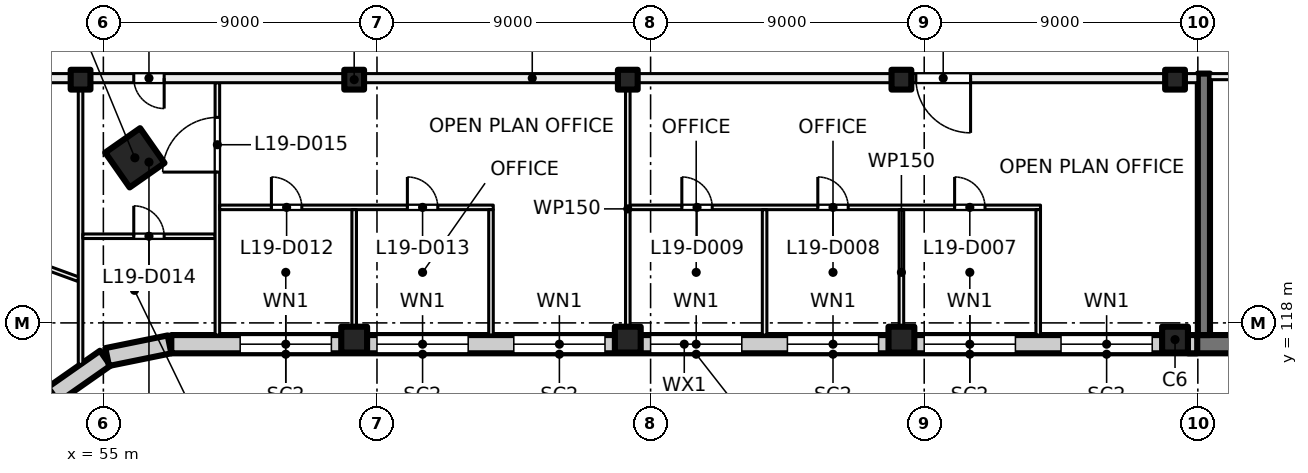
"""IFC4 building model, lengths in metres.
Left out: names, types, materials, properties, quantities, classifications, styles, units other than length and angle.
Written with IfcOpenShell. Run it as: python <this file> out.ifc"""

import sys

from ifc_helpers import new_model, si_unit, direction, frame, frame_2d, origin, origin_2d, place, context, subcontext, project, spatial, rectangle, hollow_rectangle, extrude, element, fill, save


model = new_model("IFC4")
c1 = context("Model", 3, precision=1e-05, world=origin(), true_north=direction((0.0, 1.0)))
c2 = subcontext(c1, "Body", "Model", "MODEL_VIEW")
j1 = project(units=[si_unit("LENGTHUNIT", "METRE"), si_unit("PLANEANGLEUNIT", "RADIAN")], contexts=[c1])
p1 = place(None, origin())
s1 = spatial("IfcSite", under=j1, at=p1, CompositionType="ELEMENT")
p2 = place(p1, origin())
s2 = spatial("IfcBuilding", under=s1, at=p2, CompositionType="ELEMENT")
p3 = place(p2, frame((0.0, 0.0, 85.0)))
s3 = spatial("IfcBuildingStorey", under=s2, at=p3, CompositionType="ELEMENT", Elevation=85.0)
p4 = place(p3, frame((56.036, 123.43, 0.0), z_axis=(0.0, 0.0, 1.0), x_axis=(0.573576436351, -0.819152044289, 0.0)))
e1 = element("IfcColumn", 1, at=p4, inside=s3, PredefinedType="COLUMN", context=c2, shape_type="SweptSolid", body=[
    extrude(hollow_rectangle(XDim=1.4, YDim=1.4, WallThickness=0.04, at=origin_2d()), origin(), (0.0, 0.0, 1.0), 4.0),
])
for number, where, z_axis, x_axis in (
    (2, (54.25, 126.0, 0.0), (0.0, 0.0, 1.0), (1.0, 0.0, 0.0)),
    (3, (63.25, 126.0, 0.0), (0.0, 0.0, 1.0), (1.0, 0.0, 0.0)),
    (4, (72.25, 126.0, 0.0), (0.0, 0.0, 1.0), (1.0, 0.0, 0.0)),
    (5, (81.25, 126.0, 0.0), (0.0, 0.0, 1.0), (1.0, 0.0, 0.0)),
    (6, (90.25, 126.0, 0.0), (0.0, 0.0, 1.0), (1.0, 0.0, 0.0)),
):
    element("IfcColumn", number, at=place(p3, frame(where, z_axis=z_axis, x_axis=x_axis)), inside=s3, PredefinedType="COLUMN", context=c2, shape_type="SweptSolid", body=[
        extrude(rectangle(XDim=0.65, YDim=0.65, at=origin_2d()), origin(), (0.0, 0.0, 1.0), 4.0),
    ])
for number, where, z_axis, x_axis in (
    (7, (63.25, 117.45, 0.0), (0.0, 0.0, 1.0), (1.0, 0.0, 0.0)),
    (8, (72.25, 117.45, 0.0), (0.0, 0.0, 1.0), (1.0, 0.0, 0.0)),
    (9, (81.25, 117.45, 0.0), (0.0, 0.0, 1.0), (1.0, 0.0, 0.0)),
    (10, (90.25, 117.45, 0.0), (0.0, 0.0, 1.0), (1.0, 0.0, 0.0)),
):
    element("IfcColumn", number, at=place(p3, frame(where, z_axis=z_axis, x_axis=x_axis)), inside=s3, PredefinedType="COLUMN", context=c2, shape_type="SweptSolid", body=[
        extrude(rectangle(XDim=0.85, YDim=0.85, at=origin_2d()), origin(), (0.0, 0.0, 1.0), 4.0),
    ])
p5 = place(p3, frame((99.6, 117.3, 0.0), z_axis=(0.0, 0.0, 1.0), x_axis=(-1.0, 0.0, 0.0)))
e11 = element("IfcWall", 11, at=p5, inside=s3, PredefinedType="SHEAR", context=c2, shape_type="SweptSolid", body=[
    extrude(rectangle(XDim=8.925, YDim=0.6, at=frame_2d((4.462, 0.0))), origin(), (0.0, 0.0, 1.0), 4.0),
])
p6 = place(p3, frame((91.2, 126.2, 0.0), z_axis=(0.0, 0.0, 1.0), x_axis=(0.0, -1.0, 0.0)))
e12 = element("IfcWall", 12, at=p6, inside=s3, PredefinedType="SHEAR", context=c2, shape_type="SweptSolid", body=[
    extrude(rectangle(XDim=8.6, YDim=0.4, at=frame_2d((4.3, 0.0))), origin(), (0.0, 0.0, 1.0), 4.0),
])
p7 = place(p3, frame((53.305, 115.578, 0.0), z_axis=(0.0, 0.0, 1.0), x_axis=(-0.522402266438, -0.852699168535, 0.0)))
e13 = element("IfcWall", 13, at=p7, inside=s3, PredefinedType="SOLIDWALL", context=c2, shape_type="SweptSolid", body=[
    extrude(rectangle(XDim=2.042, YDim=0.6, at=frame_2d((1.021, 0.0))), origin(), (0.0, 0.0, 1.0), 3.625),
])
for number, where, z_axis, x_axis in (
    (14, (55.062, 116.839, 0.0), (0.0, 0.0, 1.0), (-0.819, -0.574, 0.0)),
    (15, (57.175, 117.294, 0.0), (0.0, 0.0, 1.0), (-0.98, -0.199, 0.0)),
):
    element("IfcWall", number, at=place(p3, frame(where, z_axis=z_axis, x_axis=x_axis)), inside=s3, PredefinedType="SOLIDWALL", context=c2, shape_type="SweptSolid", body=[
        extrude(rectangle(XDim=2.092, YDim=0.6, at=frame_2d((1.046, 0.0))), origin(), (0.0, 0.0, 1.0), 3.625),
    ])
p8 = place(p3, frame((90.98, 117.3, 0.0), z_axis=(0.0, 0.0, 1.0), x_axis=(-1.0, 0.0, 0.0)))
e16 = element("IfcWall", 16, at=p8, inside=s3, PredefinedType="SOLIDWALL", context=c2, shape_type="SweptSolid", body=[
    extrude(rectangle(XDim=33.745, YDim=0.6, at=frame_2d((16.873, 0.0))), origin(), (0.0, 0.0, 1.0), 3.625),
])
p9 = place(p8, frame((1.48, 0.0, 0.9)))
e17 = element("IfcOpeningElement", 17, at=p9, cuts=e16, PredefinedType="OPENING", context=c2, shape_type="SweptSolid", body=[
    extrude(rectangle(XDim=3.0, YDim=2.4, at=frame_2d((1.5, 1.2))), frame((0.0, 0.31, 0.0), z_axis=(0.0, -1.0, 0.0), x_axis=(1.0, 0.0, 0.0)), (0.0, 0.0, 1.0), 0.62),
])
p10 = place(p8, frame((5.98, 0.0, 0.9)))
e18 = element("IfcOpeningElement", 18, at=p10, cuts=e16, PredefinedType="OPENING", context=c2, shape_type="SweptSolid", body=[
    extrude(rectangle(XDim=3.0, YDim=2.4, at=frame_2d((1.5, 1.2))), frame((0.0, 0.31, 0.0), z_axis=(0.0, -1.0, 0.0), x_axis=(1.0, 0.0, 0.0)), (0.0, 0.0, 1.0), 0.62),
])
p11 = place(p8, frame((10.48, 0.0, 0.9)))
e19 = element("IfcOpeningElement", 19, at=p11, cuts=e16, PredefinedType="OPENING", context=c2, shape_type="SweptSolid", body=[
    extrude(rectangle(XDim=3.0, YDim=2.4, at=frame_2d((1.5, 1.2))), frame((0.0, 0.31, 0.0), z_axis=(0.0, -1.0, 0.0), x_axis=(1.0, 0.0, 0.0)), (0.0, 0.0, 1.0), 0.62),
])
p12 = place(p8, frame((14.98, 0.0, 0.9)))
e20 = element("IfcOpeningElement", 20, at=p12, cuts=e16, PredefinedType="OPENING", context=c2, shape_type="SweptSolid", body=[
    extrude(rectangle(XDim=3.0, YDim=2.4, at=frame_2d((1.5, 1.2))), frame((0.0, 0.31, 0.0), z_axis=(0.0, -1.0, 0.0), x_axis=(1.0, 0.0, 0.0)), (0.0, 0.0, 1.0), 0.62),
])
p13 = place(p8, frame((19.48, 0.0, 0.9)))
e21 = element("IfcOpeningElement", 21, at=p13, cuts=e16, PredefinedType="OPENING", context=c2, shape_type="SweptSolid", body=[
    extrude(rectangle(XDim=3.0, YDim=2.4, at=frame_2d((1.5, 1.2))), frame((0.0, 0.31, 0.0), z_axis=(0.0, -1.0, 0.0), x_axis=(1.0, 0.0, 0.0)), (0.0, 0.0, 1.0), 0.62),
])
p14 = place(p8, frame((23.98, 0.0, 0.9)))
e22 = element("IfcOpeningElement", 22, at=p14, cuts=e16, PredefinedType="OPENING", context=c2, shape_type="SweptSolid", body=[
    extrude(rectangle(XDim=3.0, YDim=2.4, at=frame_2d((1.5, 1.2))), frame((0.0, 0.31, 0.0), z_axis=(0.0, -1.0, 0.0), x_axis=(1.0, 0.0, 0.0)), (0.0, 0.0, 1.0), 0.62),
])
p15 = place(p8, frame((28.48, 0.0, 0.9)))
e23 = element("IfcOpeningElement", 23, at=p15, cuts=e16, PredefinedType="OPENING", context=c2, shape_type="SweptSolid", body=[
    extrude(rectangle(XDim=3.0, YDim=2.4, at=frame_2d((1.5, 1.2))), frame((0.0, 0.31, 0.0), z_axis=(0.0, -1.0, 0.0), x_axis=(1.0, 0.0, 0.0)), (0.0, 0.0, 1.0), 0.62),
])
p16 = place(p3, frame((95.2, 126.1, 0.0), z_axis=(0.0, 0.0, 1.0), x_axis=(-1.0, 0.0, 0.0)))
e24 = element("IfcWall", 24, at=p16, inside=s3, PredefinedType="PARTITIONING", context=c2, shape_type="SweptSolid", body=[
    extrude(rectangle(XDim=3.8, YDim=0.2, at=frame_2d((1.9, 0.0))), origin(), (0.0, 0.0, 1.0), 3.625),
])
p17 = place(p16, frame((0.3, 0.0, 0.0)))
e25 = element("IfcOpeningElement", 25, at=p17, cuts=e24, PredefinedType="OPENING", context=c2, shape_type="SweptSolid", body=[
    extrude(rectangle(XDim=1.2, YDim=2.1, at=frame_2d((0.6, 1.05))), frame((0.0, 0.11, 0.0), z_axis=(0.0, -1.0, 0.0), x_axis=(1.0, 0.0, 0.0)), (0.0, 0.0, 1.0), 0.22),
])
p18 = place(p3, frame((46.178, 122.349, 0.0), z_axis=(0.0, 0.0, 1.0), x_axis=(0.939669476286, -0.342083725624, 0.0)))
e26 = element("IfcWall", 26, at=p18, inside=s3, PredefinedType="PARTITIONING", context=c2, shape_type="SweptSolid", body=[
    extrude(rectangle(XDim=8.516, YDim=0.15, at=frame_2d((4.258, 0.0))), origin(), (0.0, 0.0, 1.0), 3.625),
])
p19 = place(p3, frame((54.25, 116.637, 0.0), z_axis=(0.0, 0.0, 1.0), x_axis=(0.0, 1.0, 0.0)))
e27 = element("IfcWall", 27, at=p19, inside=s3, PredefinedType="PARTITIONING", context=c2, shape_type="SweptSolid", body=[
    extrude(rectangle(XDim=9.263, YDim=0.15, at=frame_2d((4.631, 0.0))), origin(), (0.0, 0.0, 1.0), 3.625),
])
p20 = place(p3, frame((54.325, 120.85, 0.0), z_axis=(0.0, 0.0, 1.0), x_axis=(1.0, 0.0, 0.0)))
e28 = element("IfcWall", 28, at=p20, inside=s3, PredefinedType="PARTITIONING", context=c2, shape_type="SweptSolid", body=[
    extrude(rectangle(XDim=4.35, YDim=0.15, at=frame_2d((2.175, 0.0))), origin(), (0.0, 0.0, 1.0), 3.625),
])
p21 = place(p20, frame((1.675, 0.0, 0.0)))
e29 = element("IfcOpeningElement", 29, at=p21, cuts=e28, PredefinedType="OPENING", context=c2, shape_type="SweptSolid", body=[
    extrude(rectangle(XDim=1.0, YDim=2.1, at=frame_2d((0.5, 1.05))), frame((0.0, 0.085, 0.0), z_axis=(0.0, -1.0, 0.0), x_axis=(1.0, 0.0, 0.0)), (0.0, 0.0, 1.0), 0.17),
])
p22 = place(p3, frame((58.75, 117.6, 0.0), z_axis=(0.0, 0.0, 1.0), x_axis=(0.0, 1.0, 0.0)))
e30 = element("IfcWall", 30, at=p22, inside=s3, PredefinedType="PARTITIONING", context=c2, shape_type="SweptSolid", body=[
    extrude(rectangle(XDim=8.3, YDim=0.15, at=frame_2d((4.15, 0.0))), origin(), (0.0, 0.0, 1.0), 3.625),
])
p23 = place(p22, frame((5.36, 0.0, 0.0)))
e31 = element("IfcOpeningElement", 31, at=p23, cuts=e30, PredefinedType="OPENING", context=c2, shape_type="SweptSolid", body=[
    extrude(rectangle(XDim=1.8, YDim=2.1, at=frame_2d((0.9, 1.05))), frame((0.0, 0.085, 0.0), z_axis=(0.0, -1.0, 0.0), x_axis=(1.0, 0.0, 0.0)), (0.0, 0.0, 1.0), 0.17),
])
p24 = place(p3, frame((58.825, 121.8, 0.0), z_axis=(0.0, 0.0, 1.0), x_axis=(1.0, 0.0, 0.0)))
e32 = element("IfcWall", 32, at=p24, inside=s3, PredefinedType="PARTITIONING", context=c2, shape_type="SweptSolid", body=[
    extrude(rectangle(XDim=9.0, YDim=0.15, at=frame_2d((4.5, 0.0))), origin(), (0.0, 0.0, 1.0), 3.625),
])
p25 = place(p24, frame((1.702, 0.0, 0.0)))
e33 = element("IfcOpeningElement", 33, at=p25, cuts=e32, PredefinedType="OPENING", context=c2, shape_type="SweptSolid", body=[
    extrude(rectangle(XDim=1.0, YDim=2.1, at=frame_2d((0.5, 1.05))), frame((0.0, 0.085, 0.0), z_axis=(0.0, -1.0, 0.0), x_axis=(1.0, 0.0, 0.0)), (0.0, 0.0, 1.0), 0.17),
])
p26 = place(p24, frame((6.175, 0.0, 0.0)))
e34 = element("IfcOpeningElement", 34, at=p26, cuts=e32, PredefinedType="OPENING", context=c2, shape_type="SweptSolid", body=[
    extrude(rectangle(XDim=1.0, YDim=2.1, at=frame_2d((0.5, 1.05))), frame((0.0, 0.085, 0.0), z_axis=(0.0, -1.0, 0.0), x_axis=(1.0, 0.0, 0.0)), (0.0, 0.0, 1.0), 0.17),
])
for number, where, z_axis, x_axis in (
    (35, (63.25, 121.725, 0.0), (0.0, 0.0, 1.0), (0.0, -1.0, 0.0)),
    (36, (67.75, 117.6, 0.0), (0.0, 0.0, 1.0), (0.0, 1.0, 0.0)),
):
    element("IfcWall", number, at=place(p3, frame(where, z_axis=z_axis, x_axis=x_axis)), inside=s3, PredefinedType="PARTITIONING", context=c2, shape_type="SweptSolid", body=[
        extrude(rectangle(XDim=4.125, YDim=0.15, at=frame_2d((2.062, 0.0))), origin(), (0.0, 0.0, 1.0), 3.625),
    ])
p27 = place(p3, frame((72.25, 117.6, 0.0), z_axis=(0.0, 0.0, 1.0), x_axis=(0.0, 1.0, 0.0)))
e37 = element("IfcWall", 37, at=p27, inside=s3, PredefinedType="PARTITIONING", context=c2, shape_type="SweptSolid", body=[
    extrude(rectangle(XDim=8.3, YDim=0.15, at=frame_2d((4.15, 0.0))), origin(), (0.0, 0.0, 1.0), 3.625),
])
p28 = place(p3, frame((72.325, 121.8, 0.0), z_axis=(0.0, 0.0, 1.0), x_axis=(1.0, 0.0, 0.0)))
e38 = element("IfcWall", 38, at=p28, inside=s3, PredefinedType="PARTITIONING", context=c2, shape_type="SweptSolid", body=[
    extrude(rectangle(XDim=13.5, YDim=0.15, at=frame_2d((6.75, 0.0))), origin(), (0.0, 0.0, 1.0), 3.625),
])
p29 = place(p28, frame((10.675, 0.0, 0.0)))
e39 = element("IfcOpeningElement", 39, at=p29, cuts=e38, PredefinedType="OPENING", context=c2, shape_type="SweptSolid", body=[
    extrude(rectangle(XDim=1.0, YDim=2.1, at=frame_2d((0.5, 1.05))), frame((0.0, 0.085, 0.0), z_axis=(0.0, -1.0, 0.0), x_axis=(1.0, 0.0, 0.0)), (0.0, 0.0, 1.0), 0.17),
])
p30 = place(p28, frame((6.175, 0.0, 0.0)))
e40 = element("IfcOpeningElement", 40, at=p30, cuts=e38, PredefinedType="OPENING", context=c2, shape_type="SweptSolid", body=[
    extrude(rectangle(XDim=1.0, YDim=2.1, at=frame_2d((0.5, 1.05))), frame((0.0, 0.085, 0.0), z_axis=(0.0, -1.0, 0.0), x_axis=(1.0, 0.0, 0.0)), (0.0, 0.0, 1.0), 0.17),
])
p31 = place(p28, frame((1.702, 0.0, 0.0)))
e41 = element("IfcOpeningElement", 41, at=p31, cuts=e38, PredefinedType="OPENING", context=c2, shape_type="SweptSolid", body=[
    extrude(rectangle(XDim=1.0, YDim=2.1, at=frame_2d((0.5, 1.05))), frame((0.0, 0.085, 0.0), z_axis=(0.0, -1.0, 0.0), x_axis=(1.0, 0.0, 0.0)), (0.0, 0.0, 1.0), 0.17),
])
for number, where, z_axis, x_axis in (
    (42, (76.75, 117.6, 0.0), (0.0, 0.0, 1.0), (0.0, 1.0, 0.0)),
    (43, (81.25, 117.6, 0.0), (0.0, 0.0, 1.0), (0.0, 1.0, 0.0)),
    (44, (85.75, 117.6, 0.0), (0.0, 0.0, 1.0), (0.0, 1.0, 0.0)),
):
    element("IfcWall", number, at=place(p3, frame(where, z_axis=z_axis, x_axis=x_axis)), inside=s3, PredefinedType="PARTITIONING", context=c2, shape_type="SweptSolid", body=[
        extrude(rectangle(XDim=4.125, YDim=0.15, at=frame_2d((2.062, 0.0))), origin(), (0.0, 0.0, 1.0), 3.625),
    ])
p32 = place(p3, frame((91.0, 126.05, 0.0), z_axis=(0.0, 0.0, 1.0), x_axis=(-1.0, 0.0, 0.0)))
e45 = element("IfcWall", 45, at=p32, inside=s3, PredefinedType="PARTITIONING", context=c2, shape_type="SweptSolid", body=[
    extrude(rectangle(XDim=43.785, YDim=0.3, at=frame_2d((21.893, 0.0))), origin(), (0.0, 0.0, 1.0), 3.625),
])
p33 = place(p32, frame((7.475, 0.0, 0.0)))
e46 = element("IfcOpeningElement", 46, at=p33, cuts=e45, PredefinedType="OPENING", context=c2, shape_type="SweptSolid", body=[
    extrude(rectangle(XDim=1.8, YDim=2.1, at=frame_2d((0.9, 1.05))), frame((0.0, 0.16, 0.0), z_axis=(0.0, -1.0, 0.0), x_axis=(1.0, 0.0, 0.0)), (0.0, 0.0, 1.0), 0.32),
])
p34 = place(p32, frame((34.0, 0.0, 0.0)))
e47 = element("IfcOpeningElement", 47, at=p34, cuts=e45, PredefinedType="OPENING", context=c2, shape_type="SweptSolid", body=[
    extrude(rectangle(XDim=1.0, YDim=2.1, at=frame_2d((0.5, 1.05))), frame((0.0, 0.16, 0.0), z_axis=(0.0, -1.0, 0.0), x_axis=(1.0, 0.0, 0.0)), (0.0, 0.0, 1.0), 0.32),
])
p35 = place(p32, frame((39.296, 0.0, 0.0)))
e48 = element("IfcOpeningElement", 48, at=p35, cuts=e45, PredefinedType="OPENING", context=c2, shape_type="SweptSolid", body=[
    extrude(rectangle(XDim=1.8, YDim=2.1, at=frame_2d((0.9, 1.05))), frame((0.0, 0.16, 0.0), z_axis=(0.0, -1.0, 0.0), x_axis=(1.0, 0.0, 0.0)), (0.0, 0.0, 1.0), 0.32),
])
p36 = place(p9, origin())
e49 = element("IfcWindow", 49, at=p36, inside=s3, PartitioningType="SINGLE_PANEL", PredefinedType="WINDOW", context=c2, shape_type="SweptSolid", body=[
    extrude(rectangle(XDim=3.0, YDim=2.4, at=frame_2d((1.5, 1.2))), frame((0.0, 0.03, 0.0), z_axis=(0.0, -1.0, 0.0), x_axis=(1.0, 0.0, 0.0)), (0.0, 0.0, 1.0), 0.06),
])
fill(e17, e49)
p37 = place(p10, origin())
e50 = element("IfcWindow", 50, at=p37, inside=s3, PartitioningType="SINGLE_PANEL", PredefinedType="WINDOW", context=c2, shape_type="SweptSolid", body=[
    extrude(rectangle(XDim=3.0, YDim=2.4, at=frame_2d((1.5, 1.2))), frame((0.0, 0.03, 0.0), z_axis=(0.0, -1.0, 0.0), x_axis=(1.0, 0.0, 0.0)), (0.0, 0.0, 1.0), 0.06),
])
fill(e18, e50)
p38 = place(p11, origin())
e51 = element("IfcWindow", 51, at=p38, inside=s3, PartitioningType="SINGLE_PANEL", PredefinedType="WINDOW", context=c2, shape_type="SweptSolid", body=[
    extrude(rectangle(XDim=3.0, YDim=2.4, at=frame_2d((1.5, 1.2))), frame((0.0, 0.03, 0.0), z_axis=(0.0, -1.0, 0.0), x_axis=(1.0, 0.0, 0.0)), (0.0, 0.0, 1.0), 0.06),
])
fill(e19, e51)
p39 = place(p12, origin())
e52 = element("IfcWindow", 52, at=p39, inside=s3, PartitioningType="SINGLE_PANEL", PredefinedType="WINDOW", context=c2, shape_type="SweptSolid", body=[
    extrude(rectangle(XDim=3.0, YDim=2.4, at=frame_2d((1.5, 1.2))), frame((0.0, 0.03, 0.0), z_axis=(0.0, -1.0, 0.0), x_axis=(1.0, 0.0, 0.0)), (0.0, 0.0, 1.0), 0.06),
])
fill(e20, e52)
p40 = place(p13, origin())
e53 = element("IfcWindow", 53, at=p40, inside=s3, PartitioningType="SINGLE_PANEL", PredefinedType="WINDOW", context=c2, shape_type="SweptSolid", body=[
    extrude(rectangle(XDim=3.0, YDim=2.4, at=frame_2d((1.5, 1.2))), frame((0.0, 0.03, 0.0), z_axis=(0.0, -1.0, 0.0), x_axis=(1.0, 0.0, 0.0)), (0.0, 0.0, 1.0), 0.06),
])
fill(e21, e53)
p41 = place(p14, origin())
e54 = element("IfcWindow", 54, at=p41, inside=s3, PartitioningType="SINGLE_PANEL", PredefinedType="WINDOW", context=c2, shape_type="SweptSolid", body=[
    extrude(rectangle(XDim=3.0, YDim=2.4, at=frame_2d((1.5, 1.2))), frame((0.0, 0.03, 0.0), z_axis=(0.0, -1.0, 0.0), x_axis=(1.0, 0.0, 0.0)), (0.0, 0.0, 1.0), 0.06),
])
fill(e22, e54)
p42 = place(p15, origin())
e55 = element("IfcWindow", 55, at=p42, inside=s3, PartitioningType="SINGLE_PANEL", PredefinedType="WINDOW", context=c2, shape_type="SweptSolid", body=[
    extrude(rectangle(XDim=3.0, YDim=2.4, at=frame_2d((1.5, 1.2))), frame((0.0, 0.03, 0.0), z_axis=(0.0, -1.0, 0.0), x_axis=(1.0, 0.0, 0.0)), (0.0, 0.0, 1.0), 0.06),
])
fill(e23, e55)
p43 = place(p29, origin())
e56 = element("IfcDoor", 56, at=p43, inside=s3, OperationType="SINGLE_SWING_LEFT", PredefinedType="DOOR", context=c2, shape_type="SweptSolid", body=[
    extrude(rectangle(XDim=1.0, YDim=2.1, at=frame_2d((0.5, 1.05))), frame((0.0, 0.025, 0.0), z_axis=(0.0, -1.0, 0.0), x_axis=(1.0, 0.0, 0.0)), (0.0, 0.0, 1.0), 0.05),
])
fill(e39, e56)
p44 = place(p30, origin())
e57 = element("IfcDoor", 57, at=p44, inside=s3, OperationType="SINGLE_SWING_RIGHT", PredefinedType="DOOR", context=c2, shape_type="SweptSolid", body=[
    extrude(rectangle(XDim=1.0, YDim=2.1, at=frame_2d((0.5, 1.05))), frame((0.0, 0.025, 0.0), z_axis=(0.0, -1.0, 0.0), x_axis=(1.0, 0.0, 0.0)), (0.0, 0.0, 1.0), 0.05),
])
fill(e40, e57)
p45 = place(p31, origin())
e58 = element("IfcDoor", 58, at=p45, inside=s3, OperationType="SINGLE_SWING_LEFT", PredefinedType="DOOR", context=c2, shape_type="SweptSolid", body=[
    extrude(rectangle(XDim=1.0, YDim=2.1, at=frame_2d((0.5, 1.05))), frame((0.0, 0.025, 0.0), z_axis=(0.0, -1.0, 0.0), x_axis=(1.0, 0.0, 0.0)), (0.0, 0.0, 1.0), 0.05),
])
fill(e41, e58)
p46 = place(p33, origin())
e59 = element("IfcDoor", 59, at=p46, inside=s3, OperationType="DOUBLE_DOOR_SINGLE_SWING", PredefinedType="DOOR", context=c2, shape_type="SweptSolid", body=[
    extrude(rectangle(XDim=1.8, YDim=2.1, at=frame_2d((0.9, 1.05))), frame((0.0, 0.025, 0.0), z_axis=(0.0, -1.0, 0.0), x_axis=(1.0, 0.0, 0.0)), (0.0, 0.0, 1.0), 0.05),
])
fill(e46, e59)
p47 = place(p34, origin())
e60 = element("IfcDoor", 60, at=p47, inside=s3, OperationType="SINGLE_SWING_LEFT", PredefinedType="DOOR", context=c2, shape_type="SweptSolid", body=[
    extrude(rectangle(XDim=1.0, YDim=2.1, at=frame_2d((0.5, 1.05))), frame((0.0, 0.025, 0.0), z_axis=(0.0, -1.0, 0.0), x_axis=(1.0, 0.0, 0.0)), (0.0, 0.0, 1.0), 0.05),
])
fill(e47, e60)
p48 = place(p25, origin())
e61 = element("IfcDoor", 61, at=p48, inside=s3, OperationType="SINGLE_SWING_LEFT", PredefinedType="DOOR", context=c2, shape_type="SweptSolid", body=[
    extrude(rectangle(XDim=1.0, YDim=2.1, at=frame_2d((0.5, 1.05))), frame((0.0, 0.025, 0.0), z_axis=(0.0, -1.0, 0.0), x_axis=(1.0, 0.0, 0.0)), (0.0, 0.0, 1.0), 0.05),
])
fill(e33, e61)
p49 = place(p26, origin())
e62 = element("IfcDoor", 62, at=p49, inside=s3, OperationType="SINGLE_SWING_RIGHT", PredefinedType="DOOR", context=c2, shape_type="SweptSolid", body=[
    extrude(rectangle(XDim=1.0, YDim=2.1, at=frame_2d((0.5, 1.05))), frame((0.0, 0.025, 0.0), z_axis=(0.0, -1.0, 0.0), x_axis=(1.0, 0.0, 0.0)), (0.0, 0.0, 1.0), 0.05),
])
fill(e34, e62)
p50 = place(p21, origin())
e63 = element("IfcDoor", 63, at=p50, inside=s3, OperationType="SINGLE_SWING_LEFT", PredefinedType="DOOR", context=c2, shape_type="SweptSolid", body=[
    extrude(rectangle(XDim=1.0, YDim=2.1, at=frame_2d((0.5, 1.05))), frame((0.0, 0.025, 0.0), z_axis=(0.0, -1.0, 0.0), x_axis=(1.0, 0.0, 0.0)), (0.0, 0.0, 1.0), 0.05),
])
fill(e29, e63)
p51 = place(p23, origin())
e64 = element("IfcDoor", 64, at=p51, inside=s3, OperationType="DOUBLE_DOOR_SINGLE_SWING", PredefinedType="DOOR", context=c2, shape_type="SweptSolid", body=[
    extrude(rectangle(XDim=1.8, YDim=2.1, at=frame_2d((0.9, 1.05))), frame((0.0, 0.025, 0.0), z_axis=(0.0, -1.0, 0.0), x_axis=(1.0, 0.0, 0.0)), (0.0, 0.0, 1.0), 0.05),
])
fill(e31, e64)
save(model, sys.argv[1])
